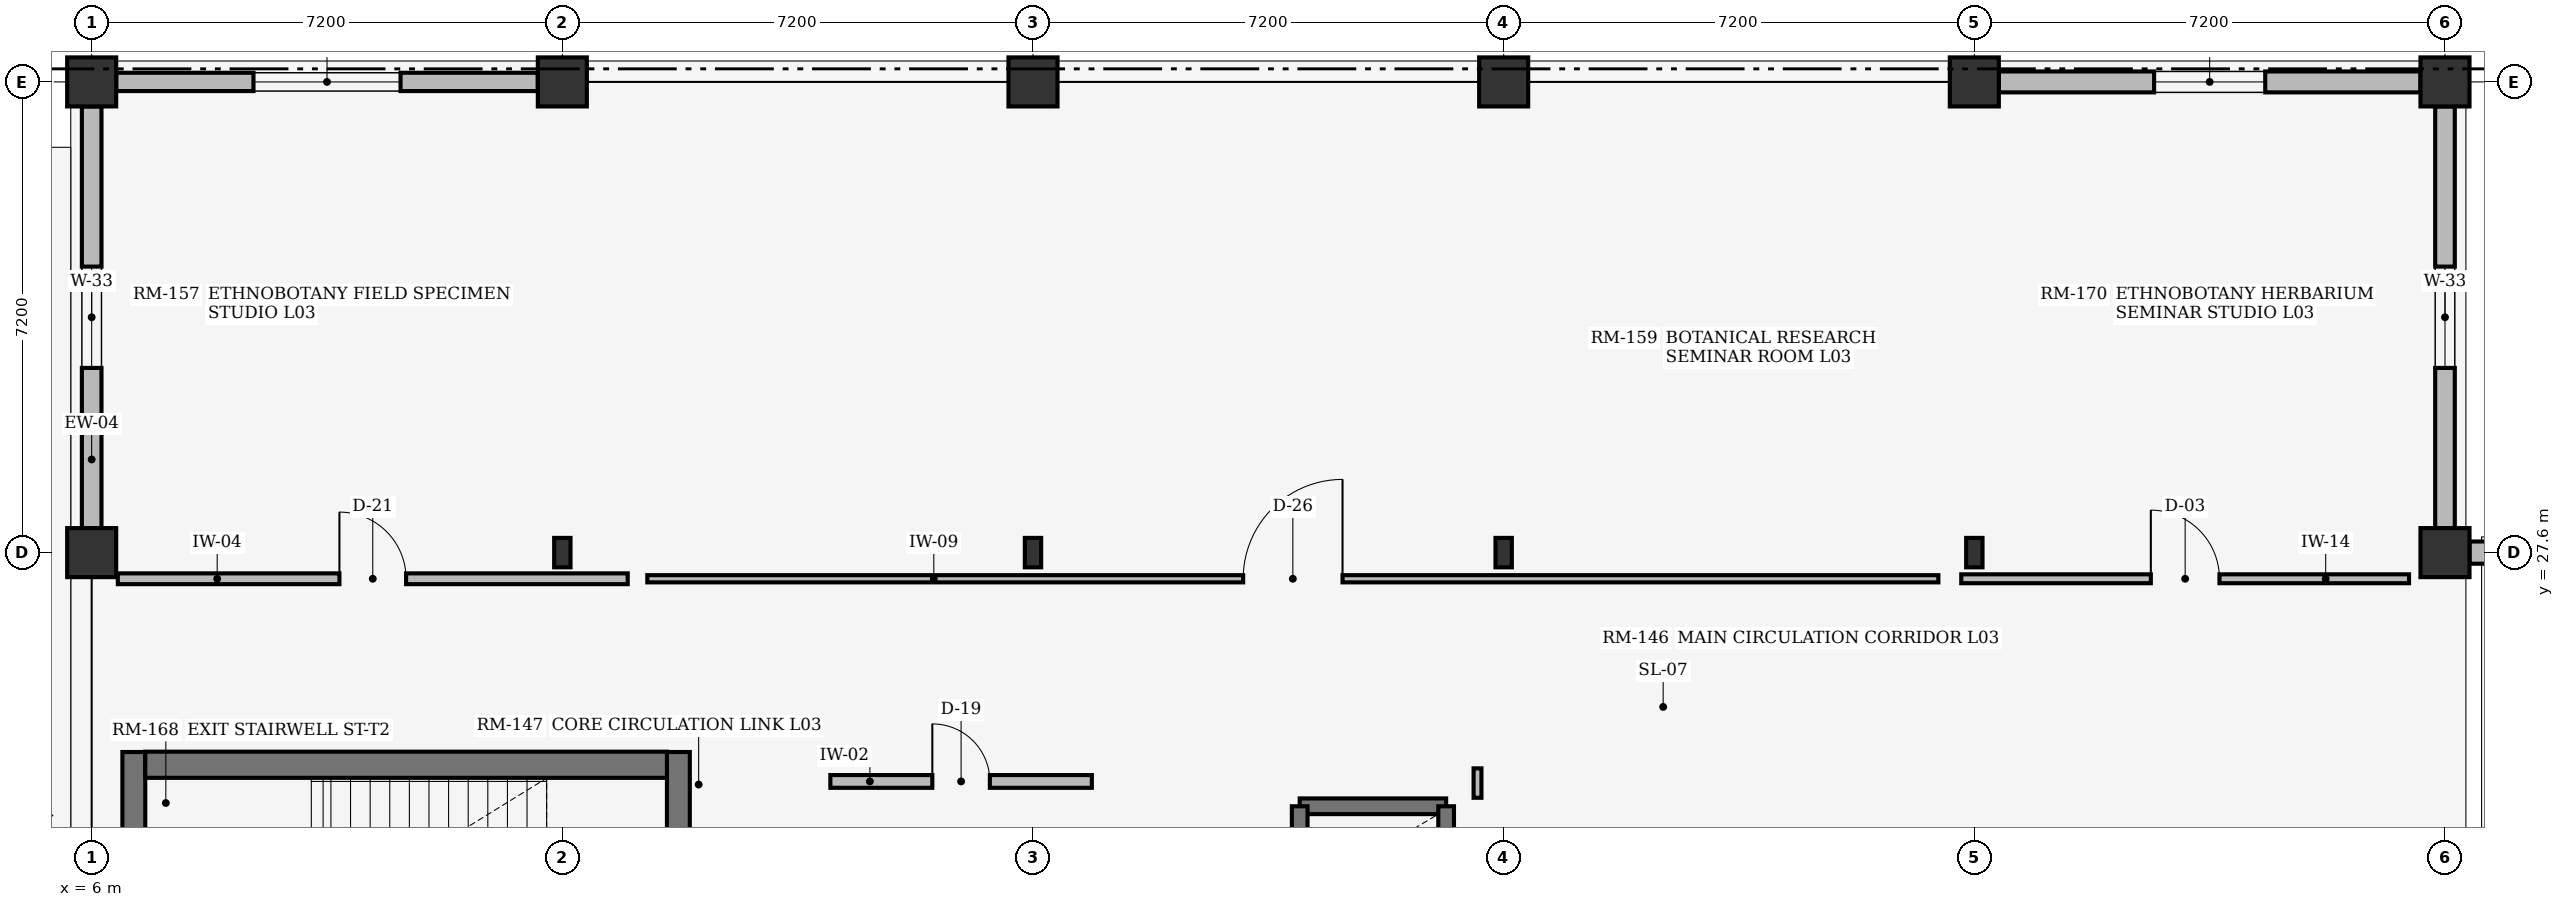
"""IFC4 building model, lengths in metres.
Left out: names, types, materials, properties, quantities, classifications, styles, units other than length and angle.
Written with IfcOpenShell. Run it as: python <this file> out.ifc"""

import sys

from ifc_helpers import new_model, si_unit, direction, frame, frame_2d, origin, origin_2d, place, context, subcontext, project, spatial, rectangle, i_section, extrude, element, fill, save


model = new_model("IFC4")
c1 = context("Model", 3, precision=1e-05, world=origin(), true_north=direction((0.0, 1.0)))
c2 = subcontext(c1, "Body", "Model", "MODEL_VIEW")
j1 = project(units=[si_unit("LENGTHUNIT", "METRE"), si_unit("PLANEANGLEUNIT", "RADIAN")], contexts=[c1])
p1 = place(None, origin())
s1 = spatial("IfcSite", under=j1, at=p1, CompositionType="ELEMENT")
p2 = place(p1, origin())
s2 = spatial("IfcBuilding", under=s1, at=p2, CompositionType="ELEMENT")
p3 = place(p2, frame((0.0, 0.0, 13.2)))
s3 = spatial("IfcBuildingStorey", under=s2, at=p3, CompositionType="ELEMENT", Elevation=13.2)
for number, where, z_axis, x_axis in (
    (1, (6.0, 27.6, 0.0), (0.0, 0.0, 1.0), (1.0, 0.0, 0.0)),
    (2, (6.0, 34.8, 0.0), (0.0, 0.0, 1.0), (1.0, 0.0, 0.0)),
):
    element("IfcColumn", number, at=place(p3, frame(where, z_axis=z_axis, x_axis=x_axis)), inside=s3, PredefinedType="COLUMN", context=c2, shape_type="SweptSolid", body=[
        extrude(rectangle(XDim=0.75, YDim=0.75, at=origin_2d()), origin(), (0.0, 0.0, 1.0), 3.635),
    ])
p4 = place(p3, frame((13.2, 27.6, 0.0), z_axis=(0.0, 0.0, 1.0), x_axis=(1.0, 0.0, 0.0)))
e3 = element("IfcColumn", 3, at=p4, inside=s3, PredefinedType="COLUMN", context=c2, shape_type="SweptSolid", body=[
    extrude(i_section(OverallWidth=0.25, OverallDepth=0.45, WebThickness=0.011, FlangeThickness=0.014, at=origin_2d()), origin(), (0.0, 0.0, 1.0), 3.635),
])
p5 = place(p3, frame((13.2, 34.8, 0.0), z_axis=(0.0, 0.0, 1.0), x_axis=(1.0, 0.0, 0.0)))
e4 = element("IfcColumn", 4, at=p5, inside=s3, PredefinedType="COLUMN", context=c2, shape_type="SweptSolid", body=[
    extrude(rectangle(XDim=0.75, YDim=0.75, at=origin_2d()), origin(), (0.0, 0.0, 1.0), 3.635),
])
p6 = place(p3, frame((20.4, 27.6, 0.0), z_axis=(0.0, 0.0, 1.0), x_axis=(1.0, 0.0, 0.0)))
e5 = element("IfcColumn", 5, at=p6, inside=s3, PredefinedType="COLUMN", context=c2, shape_type="SweptSolid", body=[
    extrude(i_section(OverallWidth=0.25, OverallDepth=0.45, WebThickness=0.011, FlangeThickness=0.014, at=origin_2d()), origin(), (0.0, 0.0, 1.0), 3.635),
])
p7 = place(p3, frame((20.4, 34.8, 0.0), z_axis=(0.0, 0.0, 1.0), x_axis=(1.0, 0.0, 0.0)))
e6 = element("IfcColumn", 6, at=p7, inside=s3, PredefinedType="COLUMN", context=c2, shape_type="SweptSolid", body=[
    extrude(rectangle(XDim=0.75, YDim=0.75, at=origin_2d()), origin(), (0.0, 0.0, 1.0), 3.635),
])
p8 = place(p3, frame((27.6, 27.6, 0.0), z_axis=(0.0, 0.0, 1.0), x_axis=(1.0, 0.0, 0.0)))
e7 = element("IfcColumn", 7, at=p8, inside=s3, PredefinedType="COLUMN", context=c2, shape_type="SweptSolid", body=[
    extrude(i_section(OverallWidth=0.25, OverallDepth=0.45, WebThickness=0.011, FlangeThickness=0.014, at=origin_2d()), origin(), (0.0, 0.0, 1.0), 3.635),
])
p9 = place(p3, frame((27.6, 34.8, 0.0), z_axis=(0.0, 0.0, 1.0), x_axis=(1.0, 0.0, 0.0)))
e8 = element("IfcColumn", 8, at=p9, inside=s3, PredefinedType="COLUMN", context=c2, shape_type="SweptSolid", body=[
    extrude(rectangle(XDim=0.75, YDim=0.75, at=origin_2d()), origin(), (0.0, 0.0, 1.0), 3.635),
])
p10 = place(p3, frame((34.8, 27.6, 0.0), z_axis=(0.0, 0.0, 1.0), x_axis=(1.0, 0.0, 0.0)))
e9 = element("IfcColumn", 9, at=p10, inside=s3, PredefinedType="COLUMN", context=c2, shape_type="SweptSolid", body=[
    extrude(i_section(OverallWidth=0.25, OverallDepth=0.45, WebThickness=0.011, FlangeThickness=0.014, at=origin_2d()), origin(), (0.0, 0.0, 1.0), 3.635),
])
for number, where, z_axis, x_axis in (
    (10, (34.8, 34.8, 0.0), (0.0, 0.0, 1.0), (1.0, 0.0, 0.0)),
    (11, (42.0, 27.6, 0.0), (0.0, 0.0, 1.0), (1.0, 0.0, 0.0)),
    (12, (42.0, 34.8, 0.0), (0.0, 0.0, 1.0), (1.0, 0.0, 0.0)),
):
    element("IfcColumn", number, at=place(p3, frame(where, z_axis=z_axis, x_axis=x_axis)), inside=s3, PredefinedType="COLUMN", context=c2, shape_type="SweptSolid", body=[
        extrude(rectangle(XDim=0.75, YDim=0.75, at=origin_2d()), origin(), (0.0, 0.0, 1.0), 3.635),
    ])
p11 = place(p3, frame((42.375, 27.6, 0.0), z_axis=(0.0, 0.0, 1.0), x_axis=(1.0, 0.0, 0.0)))
e13 = element("IfcWall", 13, at=p11, inside=s3, PredefinedType="STANDARD", context=c2, shape_type="SweptSolid", body=[
    extrude(rectangle(XDim=6.7, YDim=0.34, at=frame_2d((3.35, 0.0))), origin(), (0.0, 0.0, 1.0), 3.1),
])
p12 = place(p11, frame((2.1, 0.0, 0.75)))
e14 = element("IfcOpeningElement", 14, at=p12, cuts=e13, PredefinedType="OPENING", context=c2, shape_type="SweptSolid", body=[
    extrude(rectangle(XDim=2.5, YDim=1.35, at=frame_2d((1.25, 0.675))), frame((0.0, 0.18, 0.0), z_axis=(0.0, -1.0, 0.0), x_axis=(1.0, 0.0, 0.0)), (0.0, 0.0, 1.0), 0.36),
])
p13 = place(p3, frame((6.375, 34.8, 0.0), z_axis=(0.0, 0.0, 1.0), x_axis=(1.0, 0.0, 0.0)))
e15 = element("IfcWall", 15, at=p13, inside=s3, PredefinedType="STANDARD", context=c2, shape_type="SweptSolid", body=[
    extrude(rectangle(XDim=6.45, YDim=0.28, at=frame_2d((3.225, 0.0))), origin(), (0.0, 0.0, 1.0), 3.015),
])
p14 = place(p13, frame((2.1, 0.0, 0.75)))
e16 = element("IfcOpeningElement", 16, at=p14, cuts=e15, PredefinedType="OPENING", context=c2, shape_type="SweptSolid", body=[
    extrude(rectangle(XDim=2.25, YDim=1.5, at=frame_2d((1.125, 0.75))), frame((0.0, 0.15, 0.0), z_axis=(0.0, -1.0, 0.0), x_axis=(1.0, 0.0, 0.0)), (0.0, 0.0, 1.0), 0.3),
])
p15 = place(p3, frame((35.175, 34.8, 0.0), z_axis=(0.0, 0.0, 1.0), x_axis=(1.0, 0.0, 0.0)))
e17 = element("IfcWall", 17, at=p15, inside=s3, PredefinedType="STANDARD", context=c2, shape_type="SweptSolid", body=[
    extrude(rectangle(XDim=6.45, YDim=0.32, at=frame_2d((3.225, 0.0))), origin(), (0.0, 0.0, 1.0), 3.015),
])
p16 = place(p15, frame((2.375, 0.0, 0.75)))
e18 = element("IfcOpeningElement", 18, at=p16, cuts=e17, PredefinedType="OPENING", context=c2, shape_type="SweptSolid", body=[
    extrude(rectangle(XDim=1.7, YDim=1.25, at=frame_2d((0.85, 0.625))), frame((0.0, 0.17, 0.0), z_axis=(0.0, -1.0, 0.0), x_axis=(1.0, 0.0, 0.0)), (0.0, 0.0, 1.0), 0.34),
])
p17 = place(p3, frame((6.0, 27.975, 0.0), z_axis=(0.0, 0.0, 1.0), x_axis=(0.0, 1.0, 0.0)))
e19 = element("IfcWall", 19, at=p17, inside=s3, PredefinedType="STANDARD", context=c2, shape_type="SweptSolid", body=[
    extrude(rectangle(XDim=6.45, YDim=0.3, at=frame_2d((3.225, 0.0))), origin(), (0.0, 0.0, 1.0), 3.015),
])
p18 = place(p17, frame((2.45, 0.0, 0.75)))
e20 = element("IfcOpeningElement", 20, at=p18, cuts=e19, PredefinedType="OPENING", context=c2, shape_type="SweptSolid", body=[
    extrude(rectangle(XDim=1.55, YDim=1.35, at=frame_2d((0.775, 0.675))), frame((0.0, 0.16, 0.0), z_axis=(0.0, -1.0, 0.0), x_axis=(1.0, 0.0, 0.0)), (0.0, 0.0, 1.0), 0.32),
])
p19 = place(p3, frame((42.0, 27.975, 0.0), z_axis=(0.0, 0.0, 1.0), x_axis=(0.0, 1.0, 0.0)))
e21 = element("IfcWall", 21, at=p19, inside=s3, PredefinedType="STANDARD", context=c2, shape_type="SweptSolid", body=[
    extrude(rectangle(XDim=6.45, YDim=0.3, at=frame_2d((3.225, 0.0))), origin(), (0.0, 0.0, 1.0), 3.015),
])
p20 = place(p19, frame((2.45, 0.0, 0.75)))
e22 = element("IfcOpeningElement", 22, at=p20, cuts=e21, PredefinedType="OPENING", context=c2, shape_type="SweptSolid", body=[
    extrude(rectangle(XDim=1.55, YDim=1.35, at=frame_2d((0.775, 0.675))), frame((0.0, 0.16, 0.0), z_axis=(0.0, -1.0, 0.0), x_axis=(1.0, 0.0, 0.0)), (0.0, 0.0, 1.0), 0.32),
])
p21 = place(p3, frame((14.975, 24.55, 0.0), z_axis=(0.0, 0.0, 1.0), x_axis=(0.0, -1.0, 0.0)))
e23 = element("IfcWall", 23, at=p21, inside=s3, PredefinedType="SHEAR", context=c2, shape_type="SweptSolid", body=[
    extrude(rectangle(XDim=4.59, YDim=0.35, at=frame_2d((2.295, 0.0))), origin(), (0.0, 0.0, 1.0), 3.635),
])
p22 = place(p21, frame((1.72, 0.0, 0.0)))
e24 = element("IfcOpeningElement", 24, at=p22, cuts=e23, PredefinedType="OPENING", context=c2, shape_type="SweptSolid", body=[
    extrude(rectangle(XDim=1.15, YDim=2.2, at=frame_2d((0.575, 1.1))), frame((0.0, 0.185, 0.0), z_axis=(0.0, -1.0, 0.0), x_axis=(1.0, 0.0, 0.0)), (0.0, 0.0, 1.0), 0.37),
])
p23 = place(p3, frame((6.645, 24.55, 0.0), z_axis=(0.0, 0.0, 1.0), x_axis=(0.0, -1.0, 0.0)))
e25 = element("IfcWall", 25, at=p23, inside=s3, PredefinedType="SHEAR", context=c2, shape_type="SweptSolid", body=[
    extrude(rectangle(XDim=4.59, YDim=0.35, at=frame_2d((2.295, 0.0))), origin(), (0.0, 0.0, 1.0), 3.635),
])
p24 = place(p3, frame((14.8, 24.355, 0.0), z_axis=(0.0, 0.0, 1.0), x_axis=(-1.0, 0.0, 0.0)))
e26 = element("IfcWall", 26, at=p24, inside=s3, PredefinedType="SHEAR", context=c2, shape_type="SweptSolid", body=[
    extrude(rectangle(XDim=7.98, YDim=0.4, at=frame_2d((3.99, 0.0))), origin(), (0.0, 0.0, 1.0), 3.635),
])
p25 = place(p3, frame((24.48, 23.72, 0.0), z_axis=(0.0, 0.0, 1.0), x_axis=(1.0, 0.0, 0.0)))
e27 = element("IfcWall", 27, at=p25, inside=s3, PredefinedType="SHEAR", context=c2, shape_type="SweptSolid", body=[
    extrude(rectangle(XDim=2.24, YDim=0.24, at=frame_2d((1.12, 0.0))), origin(), (0.0, 0.0, 1.0), 3.635),
])
for number, where, z_axis, x_axis in (
    (28, (24.48, 20.78, 0.0), (0.0, 0.0, 1.0), (0.0, 1.0, 0.0)),
    (29, (26.72, 20.78, 0.0), (0.0, 0.0, 1.0), (0.0, 1.0, 0.0)),
):
    element("IfcWall", number, at=place(p3, frame(where, z_axis=z_axis, x_axis=x_axis)), inside=s3, PredefinedType="SHEAR", context=c2, shape_type="SweptSolid", body=[
        extrude(rectangle(XDim=2.94, YDim=0.24, at=frame_2d((1.47, 0.0))), origin(), (0.0, 0.0, 1.0), 3.635),
    ])
p26 = place(p3, frame((17.3, 24.1, 0.0), z_axis=(0.0, 0.0, 1.0), x_axis=(1.0, 0.0, 0.0)))
e30 = element("IfcWall", 30, at=p26, inside=s3, PredefinedType="PARTITIONING", context=c2, shape_type="SweptSolid", body=[
    extrude(rectangle(XDim=4.0, YDim=0.195, at=frame_2d((2.0, 0.0))), origin(), (0.0, 0.0, 1.0), 3.615),
])
p27 = place(p26, frame((1.56, 0.0, 0.0)))
e31 = element("IfcOpeningElement", 31, at=p27, cuts=e30, PredefinedType="OPENING", context=c2, shape_type="SweptSolid", body=[
    extrude(rectangle(XDim=0.88, YDim=2.12, at=frame_2d((0.44, 1.06))), frame((0.0, 0.107, 0.0), z_axis=(0.0, -1.0, 0.0), x_axis=(1.0, 0.0, 0.0)), (0.0, 0.0, 1.0), 0.215),
])
p28 = place(p3, frame((6.4, 27.2, 0.0), z_axis=(0.0, 0.0, 1.0), x_axis=(1.0, 0.0, 0.0)))
e32 = element("IfcWall", 32, at=p28, inside=s3, PredefinedType="PARTITIONING", context=c2, shape_type="SweptSolid", body=[
    extrude(rectangle(XDim=7.8, YDim=0.165, at=frame_2d((3.9, 0.0))), origin(), (0.0, 0.0, 1.0), 3.615),
])
p29 = place(p28, frame((3.39, 0.0, 0.0)))
e33 = element("IfcOpeningElement", 33, at=p29, cuts=e32, PredefinedType="OPENING", context=c2, shape_type="SweptSolid", body=[
    extrude(rectangle(XDim=1.02, YDim=2.18, at=frame_2d((0.51, 1.09))), frame((0.0, 0.093, 0.0), z_axis=(0.0, -1.0, 0.0), x_axis=(1.0, 0.0, 0.0)), (0.0, 0.0, 1.0), 0.185),
])
p30 = place(p3, frame((27.2, 24.3, 0.0), z_axis=(0.0, 0.0, 1.0), x_axis=(0.0, -1.0, 0.0)))
e34 = element("IfcWall", 34, at=p30, inside=s3, PredefinedType="PARTITIONING", context=c2, shape_type="SweptSolid", body=[
    extrude(rectangle(XDim=0.45, YDim=0.12, at=frame_2d((0.225, 0.0))), origin(), (0.0, 0.0, 1.0), 3.615),
])
p31 = place(p3, frame((14.5, 27.2, 0.0), z_axis=(0.0, 0.0, 1.0), x_axis=(1.0, 0.0, 0.0)))
e35 = element("IfcWall", 35, at=p31, inside=s3, PredefinedType="PARTITIONING", context=c2, shape_type="SweptSolid", body=[
    extrude(rectangle(XDim=19.75, YDim=0.11, at=frame_2d((9.875, 0.0))), origin(), (0.0, 0.0, 1.0), 3.615),
])
p32 = place(p31, frame((9.115, 0.0, 0.0)))
e36 = element("IfcOpeningElement", 36, at=p32, cuts=e35, PredefinedType="OPENING", context=c2, shape_type="SweptSolid", body=[
    extrude(rectangle(XDim=1.52, YDim=2.26, at=frame_2d((0.76, 1.13))), frame((0.0, 0.065, 0.0), z_axis=(0.0, -1.0, 0.0), x_axis=(1.0, 0.0, 0.0)), (0.0, 0.0, 1.0), 0.13),
])
p33 = place(p3, frame((34.6, 27.2, 0.0), z_axis=(0.0, 0.0, 1.0), x_axis=(1.0, 0.0, 0.0)))
e37 = element("IfcWall", 37, at=p33, inside=s3, PredefinedType="PARTITIONING", context=c2, shape_type="SweptSolid", body=[
    extrude(rectangle(XDim=6.85, YDim=0.136, at=frame_2d((3.425, 0.0))), origin(), (0.0, 0.0, 1.0), 3.615),
])
p34 = place(p33, frame((2.9, 0.0, 0.0)))
e38 = element("IfcOpeningElement", 38, at=p34, cuts=e37, PredefinedType="OPENING", context=c2, shape_type="SweptSolid", body=[
    extrude(rectangle(XDim=1.05, YDim=2.15, at=frame_2d((0.525, 1.075))), frame((0.0, 0.078, 0.0), z_axis=(0.0, -1.0, 0.0), x_axis=(1.0, 0.0, 0.0)), (0.0, 0.0, 1.0), 0.156),
])
p35 = place(p14, origin())
e39 = element("IfcWindow", 39, at=p35, inside=s3, PartitioningType="SINGLE_PANEL", PredefinedType="WINDOW", context=c2, shape_type="SweptSolid", body=[
    extrude(rectangle(XDim=2.25, YDim=1.5, at=frame_2d((1.125, 0.75))), frame((0.0, 0.03, 0.0), z_axis=(0.0, -1.0, 0.0), x_axis=(1.0, 0.0, 0.0)), (0.0, 0.0, 1.0), 0.06),
])
fill(e16, e39)
p36 = place(p16, origin())
e40 = element("IfcWindow", 40, at=p36, inside=s3, PartitioningType="SINGLE_PANEL", PredefinedType="WINDOW", context=c2, shape_type="SweptSolid", body=[
    extrude(rectangle(XDim=1.7, YDim=1.25, at=frame_2d((0.85, 0.625))), frame((0.0, 0.03, 0.0), z_axis=(0.0, -1.0, 0.0), x_axis=(1.0, 0.0, 0.0)), (0.0, 0.0, 1.0), 0.06),
])
fill(e18, e40)
p37 = place(p18, origin())
e41 = element("IfcWindow", 41, at=p37, inside=s3, PartitioningType="SINGLE_PANEL", PredefinedType="WINDOW", context=c2, shape_type="SweptSolid", body=[
    extrude(rectangle(XDim=1.55, YDim=1.35, at=frame_2d((0.775, 0.675))), frame((0.0, 0.03, 0.0), z_axis=(0.0, -1.0, 0.0), x_axis=(1.0, 0.0, 0.0)), (0.0, 0.0, 1.0), 0.06),
])
fill(e20, e41)
p38 = place(p20, origin())
e42 = element("IfcWindow", 42, at=p38, inside=s3, PartitioningType="SINGLE_PANEL", PredefinedType="WINDOW", context=c2, shape_type="SweptSolid", body=[
    extrude(rectangle(XDim=1.55, YDim=1.35, at=frame_2d((0.775, 0.675))), frame((0.0, 0.03, 0.0), z_axis=(0.0, -1.0, 0.0), x_axis=(1.0, 0.0, 0.0)), (0.0, 0.0, 1.0), 0.06),
])
fill(e22, e42)
p39 = place(p27, origin())
e43 = element("IfcDoor", 43, at=p39, inside=s3, OperationType="SINGLE_SWING_LEFT", PredefinedType="DOOR", context=c2, shape_type="SweptSolid", body=[
    extrude(rectangle(XDim=0.88, YDim=2.12, at=frame_2d((0.44, 1.06))), frame((0.0, 0.025, 0.0), z_axis=(0.0, -1.0, 0.0), x_axis=(1.0, 0.0, 0.0)), (0.0, 0.0, 1.0), 0.05),
])
fill(e31, e43)
p40 = place(p29, origin())
e44 = element("IfcDoor", 44, at=p40, inside=s3, OperationType="SINGLE_SWING_LEFT", PredefinedType="DOOR", context=c2, shape_type="SweptSolid", body=[
    extrude(rectangle(XDim=1.02, YDim=2.18, at=frame_2d((0.51, 1.09))), frame((0.0, 0.025, 0.0), z_axis=(0.0, -1.0, 0.0), x_axis=(1.0, 0.0, 0.0)), (0.0, 0.0, 1.0), 0.05),
])
fill(e33, e44)
p41 = place(p32, frame((1.52, 0.0, 0.0), z_axis=(0.0, 0.0, 1.0), x_axis=(-1.0, 0.0, 0.0)))
e45 = element("IfcDoor", 45, at=p41, inside=s3, OperationType="SINGLE_SWING_RIGHT", PredefinedType="DOOR", context=c2, shape_type="SweptSolid", body=[
    extrude(rectangle(XDim=1.52, YDim=2.26, at=frame_2d((0.76, 1.13))), frame((0.0, 0.025, 0.0), z_axis=(0.0, -1.0, 0.0), x_axis=(1.0, 0.0, 0.0)), (0.0, 0.0, 1.0), 0.05),
])
fill(e36, e45)
p42 = place(p34, origin())
e46 = element("IfcDoor", 46, at=p42, inside=s3, OperationType="SINGLE_SWING_LEFT", PredefinedType="DOOR", context=c2, shape_type="SweptSolid", body=[
    extrude(rectangle(XDim=1.05, YDim=2.15, at=frame_2d((0.525, 1.075))), frame((0.0, 0.025, 0.0), z_axis=(0.0, -1.0, 0.0), x_axis=(1.0, 0.0, 0.0)), (0.0, 0.0, 1.0), 0.05),
])
fill(e38, e46)
save(model, sys.argv[1])
